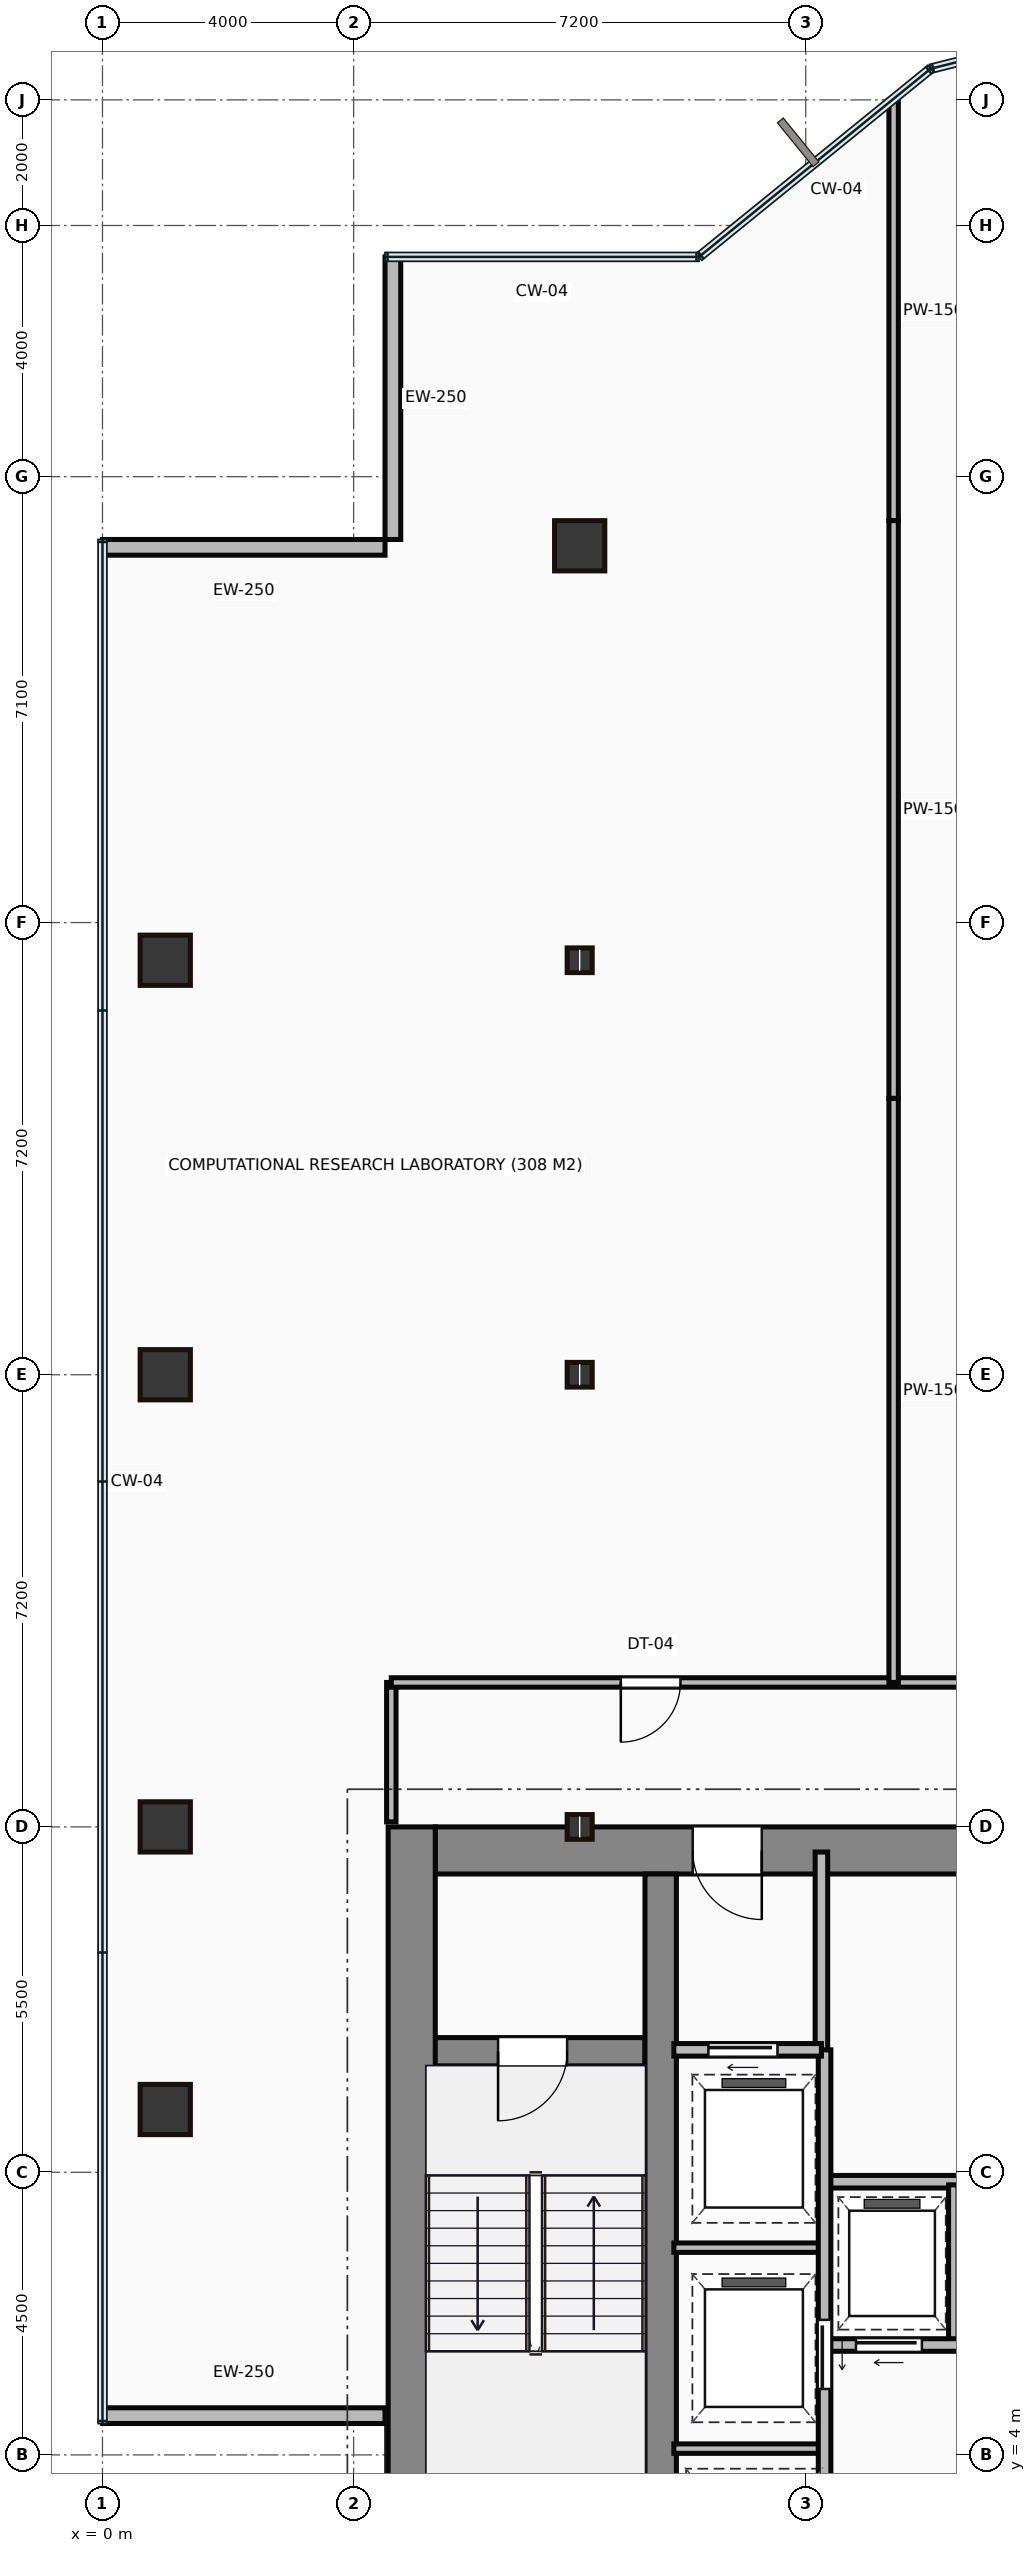
"""IFC4 building model, lengths in metres.
Left out: names, types, materials, properties, quantities, classifications, styles, units other than length and angle.
Written with IfcOpenShell. Run it as: python <this file> out.ifc"""

import sys

from ifc_helpers import new_model, si_unit, direction, frame, frame_2d, origin, origin_2d, place, context, subcontext, project, spatial, rectangle, hollow_rectangle, i_section, extrude, source, transform, mapped, element, fill, save


model = new_model("IFC4")
c1 = context("Model", 3, precision=1e-05, world=origin(), true_north=direction((0.0, 1.0)))
c2 = subcontext(c1, "Body", "Model", "MODEL_VIEW")
j1 = project(units=[si_unit("LENGTHUNIT", "METRE"), si_unit("PLANEANGLEUNIT", "RADIAN")], contexts=[c1])
p1 = place(None, origin())
s1 = spatial("IfcSite", under=j1, at=p1, CompositionType="ELEMENT")
p2 = place(p1, origin())
s2 = spatial("IfcBuilding", under=s1, at=p2, CompositionType="ELEMENT")
p3 = place(p2, frame((0.0, 0.0, 117.85)))
s3 = spatial("IfcBuildingStorey", under=s2, at=p3, CompositionType="ELEMENT", Elevation=117.85)
m1 = source(origin(), c2, "Body", "SweptSolid", [
    extrude(rectangle(XDim=13.1, YDim=0.75, at=frame_2d((6.55, 0.0))), origin(), (0.0, 0.0, 1.0), 3.65),
])
p4 = place(p3, frame((4.925, 0.9, 0.0), z_axis=(0.0, 0.0, 1.0), x_axis=(0.0, 1.0, 0.0)))
e1 = element("IfcWall", 1, at=p4, inside=s3, PredefinedType="SHEAR", context=c2, shape_type="MappedRepresentation", body=[
    mapped(m1, transform((0.0, 0.0, 0.0))),
])
m2 = source(origin(), c2, "Body", "SweptSolid", [
    extrude(rectangle(XDim=9.1, YDim=0.75, at=frame_2d((4.55, 0.0))), origin(), (0.0, 0.0, 1.0), 3.65),
])
p5 = place(p3, frame((5.3, 13.625, 0.0), z_axis=(0.0, 0.0, 1.0), x_axis=(1.0, 0.0, 0.0)))
e2 = element("IfcWall", 2, at=p5, inside=s3, PredefinedType="SHEAR", context=c2, shape_type="MappedRepresentation", body=[
    mapped(m2, transform((0.0, 0.0, 0.0))),
])
p6 = place(p5, frame((4.1, 0.0, 0.0)))
e3 = element("IfcOpeningElement", 3, at=p6, cuts=e2, PredefinedType="OPENING", context=c2, shape_type="SweptSolid", body=[
    extrude(rectangle(XDim=1.1, YDim=2.15, at=frame_2d((0.55, 1.075))), frame((0.0, 0.385, 0.0), z_axis=(0.0, -1.0, 0.0), x_axis=(1.0, 0.0, 0.0)), (0.0, 0.0, 1.0), 0.77),
])
m3 = source(origin(), c2, "Body", "SweptSolid", [
    extrude(rectangle(XDim=12.35, YDim=0.5, at=frame_2d((6.175, 0.0))), origin(), (0.0, 0.0, 1.0), 3.65),
])
p7 = place(p3, frame((8.89, 0.9, 0.0), z_axis=(0.0, 0.0, 1.0), x_axis=(0.0, 1.0, 0.0)))
e4 = element("IfcWall", 4, at=p7, inside=s3, PredefinedType="SHEAR", context=c2, shape_type="MappedRepresentation", body=[
    mapped(m3, transform((0.0, 0.0, 0.0))),
])
m4 = source(origin(), c2, "Body", "SweptSolid", [
    extrude(rectangle(XDim=3.39, YDim=0.45, at=frame_2d((1.695, 0.0))), origin(), (0.0, 0.0, 1.0), 3.65),
])
p8 = place(p3, frame((5.25, 10.42, 0.0), z_axis=(0.0, 0.0, 1.0), x_axis=(1.0, 0.0, 0.0)))
e5 = element("IfcWall", 5, at=p8, inside=s3, PredefinedType="SHEAR", context=c2, shape_type="MappedRepresentation", body=[
    mapped(m4, transform((0.0, 0.0, 0.0))),
])
p9 = place(p8, frame((1.05, 0.0, 0.0)))
e6 = element("IfcOpeningElement", 6, at=p9, cuts=e5, PredefinedType="OPENING", context=c2, shape_type="SweptSolid", body=[
    extrude(rectangle(XDim=1.1, YDim=2.15, at=frame_2d((0.55, 1.075))), frame((0.0, 0.235, 0.0), z_axis=(0.0, -1.0, 0.0), x_axis=(1.0, 0.0, 0.0)), (0.0, 0.0, 1.0), 0.47),
])
m5 = source(origin(), c2, "Body", "SweptSolid", [
    extrude(hollow_rectangle(XDim=0.8, YDim=0.8, WallThickness=0.04, at=origin_2d()), origin(), (0.0, 0.0, 1.0), 3.65),
])
for number, where, z_axis, x_axis in (
    (7, (1.0, 9.5, 0.0), (0.0, 0.0, 1.0), (1.0, 0.0, 0.0)),
    (8, (1.0, 14.0, 0.0), (0.0, 0.0, 1.0), (1.0, 0.0, 0.0)),
    (9, (1.0, 21.2, 0.0), (0.0, 0.0, 1.0), (1.0, 0.0, 0.0)),
    (10, (1.0, 27.8, 0.0), (0.0, 0.0, 1.0), (1.0, 0.0, 0.0)),
):
    element("IfcColumn", number, at=place(p3, frame(where, z_axis=z_axis, x_axis=x_axis)), inside=s3, PredefinedType="COLUMN", context=c2, shape_type="MappedRepresentation", body=[
        mapped(m5, transform((0.0, 0.0, 0.0))),
    ])
m6 = source(origin(), c2, "Body", "SweptSolid", [
    extrude(i_section(OverallWidth=0.399, OverallDepth=0.393, WebThickness=0.023, FlangeThickness=0.037, at=origin_2d()), origin(), (0.0, 0.0, 1.0), 3.65),
])
for number, where, z_axis, x_axis in (
    (11, (7.6, 14.0, 0.0), (0.0, 0.0, 1.0), (1.0, 0.0, 0.0)),
    (12, (7.6, 21.2, 0.0), (0.0, 0.0, 1.0), (1.0, 0.0, 0.0)),
    (13, (7.6, 27.8, 0.0), (0.0, 0.0, 1.0), (1.0, 0.0, 0.0)),
):
    element("IfcColumn", number, at=place(p3, frame(where, z_axis=z_axis, x_axis=x_axis)), inside=s3, PredefinedType="COLUMN", context=c2, shape_type="MappedRepresentation", body=[
        mapped(m6, transform((0.0, 0.0, 0.0))),
    ])
p10 = place(p3, frame((7.6, 34.4, 0.0), z_axis=(0.0, 0.0, 1.0), x_axis=(1.0, 0.0, 0.0)))
e14 = element("IfcColumn", 14, at=p10, inside=s3, PredefinedType="COLUMN", context=c2, shape_type="MappedRepresentation", body=[
    mapped(m5, transform((0.0, 0.0, 0.0))),
])
m7 = source(origin(), c2, "Body", "SweptSolid", [
    extrude(rectangle(XDim=4.5, YDim=0.25, at=frame_2d((2.25, 0.0))), origin(), (0.0, 0.0, 1.0), 3.4),
])
for number, where, z_axis, x_axis in (
    (15, (4.625, 39.0, 0.0), (0.0, 0.0, 1.0), (0.0, -1.0, 0.0)),
    (16, (4.5, 34.375, 0.0), (0.0, 0.0, 1.0), (-1.0, 0.0, 0.0)),
    (17, (0.0, 4.625, 0.0), (0.0, 0.0, 1.0), (1.0, 0.0, 0.0)),
):
    element("IfcWall", number, at=place(p3, frame(where, z_axis=z_axis, x_axis=x_axis)), inside=s3, PredefinedType="STANDARD", context=c2, shape_type="MappedRepresentation", body=[
        mapped(m7, transform((0.0, 0.0, 0.0))),
    ])
m8 = source(origin(), c2, "Body", "SweptSolid", [
    extrude(rectangle(XDim=3.18, YDim=0.2, at=frame_2d((1.59, 0.0))), origin(), (0.0, 0.0, 1.0), 3.4),
])
p11 = place(p3, frame((11.45, 10.42, 0.0), z_axis=(0.0, 0.0, 1.0), x_axis=(0.0, 1.0, 0.0)))
e18 = element("IfcWall", 18, at=p11, inside=s3, PredefinedType="PARTITIONING", context=c2, shape_type="MappedRepresentation", body=[
    mapped(m8, transform((0.0, 0.0, 0.0))),
])
m9 = source(origin(), c2, "Body", "SweptSolid", [
    extrude(rectangle(XDim=2.35, YDim=0.2, at=frame_2d((1.175, 0.0))), origin(), (0.0, 0.0, 1.0), 3.4),
])
p12 = place(p3, frame((9.1, 10.45, 0.0), z_axis=(0.0, 0.0, 1.0), x_axis=(1.0, 0.0, 0.0)))
e19 = element("IfcWall", 19, at=p12, inside=s3, PredefinedType="PARTITIONING", context=c2, shape_type="MappedRepresentation", body=[
    mapped(m9, transform((0.0, 0.0, 0.0))),
])
p13 = place(p12, frame((0.55, 0.0, 0.0)))
e20 = element("IfcOpeningElement", 20, at=p13, cuts=e19, PredefinedType="OPENING", context=c2, shape_type="SweptSolid", body=[
    extrude(rectangle(XDim=1.1, YDim=2.15, at=frame_2d((0.55, 1.075))), frame((0.0, 0.11, 0.0), z_axis=(0.0, -1.0, 0.0), x_axis=(1.0, 0.0, 0.0)), (0.0, 0.0, 1.0), 0.22),
])
m10 = source(origin(), c2, "Body", "SweptSolid", [
    extrude(rectangle(XDim=9.6, YDim=0.2, at=frame_2d((4.8, 0.0))), origin(), (0.0, 0.0, 1.0), 3.4),
])
p14 = place(p3, frame((11.5, 0.85, 0.0), z_axis=(0.0, 0.0, 1.0), x_axis=(0.0, 1.0, 0.0)))
e21 = element("IfcWall", 21, at=p14, inside=s3, PredefinedType="PARTITIONING", context=c2, shape_type="MappedRepresentation", body=[
    mapped(m10, transform((0.0, 0.0, 0.0))),
])
p15 = place(p14, frame((4.2, 0.0, 0.0)))
e22 = element("IfcOpeningElement", 22, at=p15, cuts=e21, PredefinedType="OPENING", context=c2, shape_type="SweptSolid", body=[
    extrude(rectangle(XDim=1.1, YDim=2.15, at=frame_2d((0.55, 1.075))), frame((0.0, 0.11, 0.0), z_axis=(0.0, -1.0, 0.0), x_axis=(1.0, 0.0, 0.0)), (0.0, 0.0, 1.0), 0.22),
])
p16 = place(p14, frame((0.9, 0.0, 0.0)))
e23 = element("IfcOpeningElement", 23, at=p16, cuts=e21, PredefinedType="OPENING", context=c2, shape_type="SweptSolid", body=[
    extrude(rectangle(XDim=1.2, YDim=2.15, at=frame_2d((0.6, 1.075))), frame((0.0, 0.11, 0.0), z_axis=(0.0, -1.0, 0.0), x_axis=(1.0, 0.0, 0.0)), (0.0, 0.0, 1.0), 0.22),
])
m11 = source(origin(), c2, "Body", "SweptSolid", [
    extrude(rectangle(XDim=2.4, YDim=0.15, at=frame_2d((1.2, 0.0))), origin(), (0.0, 0.0, 1.0), 3.4),
])
for number, where, z_axis, x_axis in (
    (24, (9.1, 4.1, 0.0), (0.0, 0.0, 1.0), (1.0, 0.0, 0.0)),
    (25, (9.1, 7.3, 0.0), (0.0, 0.0, 1.0), (1.0, 0.0, 0.0)),
):
    element("IfcWall", number, at=place(p3, frame(where, z_axis=z_axis, x_axis=x_axis)), inside=s3, PredefinedType="PARTITIONING", context=c2, shape_type="MappedRepresentation", body=[
        mapped(m11, transform((0.0, 0.0, 0.0))),
    ])
m12 = source(origin(), c2, "Body", "SweptSolid", [
    extrude(rectangle(XDim=11.85, YDim=0.2, at=frame_2d((5.925, 0.0))), origin(), (0.0, 0.0, 1.0), 3.4),
])
p17 = place(p3, frame((11.55, 5.75, 0.0), z_axis=(0.0, 0.0, 1.0), x_axis=(1.0, 0.0, 0.0)))
e26 = element("IfcWall", 26, at=p17, inside=s3, PredefinedType="PARTITIONING", context=c2, shape_type="MappedRepresentation", body=[
    mapped(m12, transform((0.0, 0.0, 0.0))),
])
p18 = place(p17, frame((0.45, 0.0, 0.0)))
e27 = element("IfcOpeningElement", 27, at=p18, cuts=e26, PredefinedType="OPENING", context=c2, shape_type="SweptSolid", body=[
    extrude(rectangle(XDim=1.05, YDim=2.15, at=frame_2d((0.525, 1.075))), frame((0.0, 0.11, 0.0), z_axis=(0.0, -1.0, 0.0), x_axis=(1.0, 0.0, 0.0)), (0.0, 0.0, 1.0), 0.22),
])
p19 = place(p17, frame((2.4, 0.0, 0.0)))
e28 = element("IfcOpeningElement", 28, at=p19, cuts=e26, PredefinedType="OPENING", context=c2, shape_type="SweptSolid", body=[
    extrude(rectangle(XDim=1.05, YDim=2.15, at=frame_2d((0.525, 1.075))), frame((0.0, 0.11, 0.0), z_axis=(0.0, -1.0, 0.0), x_axis=(1.0, 0.0, 0.0)), (0.0, 0.0, 1.0), 0.22),
])
p20 = place(p17, frame((4.35, 0.0, 0.0)))
e29 = element("IfcOpeningElement", 29, at=p20, cuts=e26, PredefinedType="OPENING", context=c2, shape_type="SweptSolid", body=[
    extrude(rectangle(XDim=1.05, YDim=2.15, at=frame_2d((0.525, 1.075))), frame((0.0, 0.11, 0.0), z_axis=(0.0, -1.0, 0.0), x_axis=(1.0, 0.0, 0.0)), (0.0, 0.0, 1.0), 0.22),
])
p21 = place(p17, frame((6.3, 0.0, 0.0)))
e30 = element("IfcOpeningElement", 30, at=p21, cuts=e26, PredefinedType="OPENING", context=c2, shape_type="SweptSolid", body=[
    extrude(rectangle(XDim=1.05, YDim=2.15, at=frame_2d((0.525, 1.075))), frame((0.0, 0.11, 0.0), z_axis=(0.0, -1.0, 0.0), x_axis=(1.0, 0.0, 0.0)), (0.0, 0.0, 1.0), 0.22),
])
p22 = place(p17, frame((8.25, 0.0, 0.0)))
e31 = element("IfcOpeningElement", 31, at=p22, cuts=e26, PredefinedType="OPENING", context=c2, shape_type="SweptSolid", body=[
    extrude(rectangle(XDim=1.05, YDim=2.15, at=frame_2d((0.525, 1.075))), frame((0.0, 0.11, 0.0), z_axis=(0.0, -1.0, 0.0), x_axis=(1.0, 0.0, 0.0)), (0.0, 0.0, 1.0), 0.22),
])
p23 = place(p17, frame((10.2, 0.0, 0.0)))
e32 = element("IfcOpeningElement", 32, at=p23, cuts=e26, PredefinedType="OPENING", context=c2, shape_type="SweptSolid", body=[
    extrude(rectangle(XDim=1.05, YDim=2.15, at=frame_2d((0.525, 1.075))), frame((0.0, 0.11, 0.0), z_axis=(0.0, -1.0, 0.0), x_axis=(1.0, 0.0, 0.0)), (0.0, 0.0, 1.0), 0.22),
])
p24 = place(p3, frame((11.55, 8.35, 0.0), z_axis=(0.0, 0.0, 1.0), x_axis=(1.0, 0.0, 0.0)))
e33 = element("IfcWall", 33, at=p24, inside=s3, PredefinedType="PARTITIONING", context=c2, shape_type="MappedRepresentation", body=[
    mapped(m12, transform((0.0, 0.0, 0.0))),
])
m13 = source(origin(), c2, "Body", "SweptSolid", [
    extrude(rectangle(XDim=2.5, YDim=0.15, at=frame_2d((1.25, 0.0))), origin(), (0.0, 0.0, 1.0), 3.4),
])
p25 = place(p3, frame((13.55, 5.8, 0.0), z_axis=(0.0, 0.0, 1.0), x_axis=(0.0, 1.0, 0.0)))
e34 = element("IfcWall", 34, at=p25, inside=s3, PredefinedType="PARTITIONING", context=c2, shape_type="MappedRepresentation", body=[
    mapped(m13, transform((0.0, 0.0, 0.0))),
])
m14 = source(origin(), c2, "Body", "SweptSolid", [
    extrude(rectangle(XDim=2.22, YDim=0.15, at=frame_2d((1.11, 0.0))), origin(), (0.0, 0.0, 1.0), 3.4),
])
p26 = place(p3, frame((4.6, 14.08, 0.0), z_axis=(0.0, 0.0, 1.0), x_axis=(0.0, 1.0, 0.0)))
e35 = element("IfcWall", 35, at=p26, inside=s3, PredefinedType="PARTITIONING", context=c2, shape_type="MappedRepresentation", body=[
    mapped(m14, transform((0.0, 0.0, 0.0))),
])
m15 = source(origin(), c2, "Body", "SweptSolid", [
    extrude(rectangle(XDim=25.8, YDim=0.15, at=frame_2d((12.9, 0.0))), origin(), (0.0, 0.0, 1.0), 3.4),
])
p27 = place(p3, frame((4.6, 16.3, 0.0), z_axis=(0.0, 0.0, 1.0), x_axis=(1.0, 0.0, 0.0)))
e36 = element("IfcWall", 36, at=p27, inside=s3, PredefinedType="PARTITIONING", context=c2, shape_type="MappedRepresentation", body=[
    mapped(m15, transform((0.0, 0.0, 0.0))),
])
p28 = place(p27, frame((3.655, 0.0, 0.0)))
e37 = element("IfcOpeningElement", 37, at=p28, cuts=e36, PredefinedType="OPENING", context=c2, shape_type="SweptSolid", body=[
    extrude(rectangle(XDim=0.95, YDim=2.15, at=frame_2d((0.475, 1.075))), frame((0.0, 0.085, 0.0), z_axis=(0.0, -1.0, 0.0), x_axis=(1.0, 0.0, 0.0)), (0.0, 0.0, 1.0), 0.17),
])
p29 = place(p27, frame((16.295, 0.0, 0.0)))
e38 = element("IfcOpeningElement", 38, at=p29, cuts=e36, PredefinedType="OPENING", context=c2, shape_type="SweptSolid", body=[
    extrude(rectangle(XDim=0.95, YDim=2.15, at=frame_2d((0.475, 1.075))), frame((0.0, 0.085, 0.0), z_axis=(0.0, -1.0, 0.0), x_axis=(1.0, 0.0, 0.0)), (0.0, 0.0, 1.0), 0.17),
])
m16 = source(origin(), c2, "Body", "SweptSolid", [
    extrude(rectangle(XDim=6.692, YDim=0.15, at=frame_2d((3.346, 0.0))), origin(), (0.0, 0.0, 1.0), 3.4),
])
p30 = place(p3, frame((12.6, 41.492, 0.0), z_axis=(0.0, 0.0, 1.0), x_axis=(0.0, -1.0, 0.0)))
e39 = element("IfcWall", 39, at=p30, inside=s3, PredefinedType="PARTITIONING", context=c2, shape_type="MappedRepresentation", body=[
    mapped(m16, transform((0.0, 0.0, 0.0))),
])
m17 = source(origin(), c2, "Body", "SweptSolid", [
    extrude(rectangle(XDim=9.2, YDim=0.15, at=frame_2d((4.6, 0.0))), origin(), (0.0, 0.0, 1.0), 3.4),
])
p31 = place(p3, frame((12.6, 34.8, 0.0), z_axis=(0.0, 0.0, 1.0), x_axis=(0.0, -1.0, 0.0)))
e40 = element("IfcWall", 40, at=p31, inside=s3, PredefinedType="PARTITIONING", context=c2, shape_type="MappedRepresentation", body=[
    mapped(m17, transform((0.0, 0.0, 0.0))),
])
m18 = source(origin(), c2, "Body", "SweptSolid", [
    extrude(rectangle(XDim=9.3, YDim=0.15, at=frame_2d((4.65, 0.0))), origin(), (0.0, 0.0, 1.0), 3.4),
])
p32 = place(p3, frame((12.6, 25.6, 0.0), z_axis=(0.0, 0.0, 1.0), x_axis=(0.0, -1.0, 0.0)))
e41 = element("IfcWall", 41, at=p32, inside=s3, PredefinedType="PARTITIONING", context=c2, shape_type="MappedRepresentation", body=[
    mapped(m18, transform((0.0, 0.0, 0.0))),
])
m19 = source(origin(), c2, "Body", "SweptSolid", [
    extrude(rectangle(XDim=1.1, YDim=2.15, at=frame_2d((0.55, 1.075))), frame((0.0, 0.025, 0.0), z_axis=(0.0, -1.0, 0.0), x_axis=(1.0, 0.0, 0.0)), (0.0, 0.0, 1.0), 0.05),
])
p33 = place(p9, frame((1.1, 0.0, 0.0), z_axis=(0.0, 0.0, 1.0), x_axis=(-1.0, 0.0, 0.0)))
e42 = element("IfcDoor", 42, at=p33, inside=s3, OperationType="SINGLE_SWING_LEFT", PredefinedType="DOOR", context=c2, shape_type="MappedRepresentation", body=[
    mapped(m19, transform((0.0, 0.0, 0.0))),
])
fill(e6, e42)
p34 = place(p6, origin())
e43 = element("IfcDoor", 43, at=p34, inside=s3, OperationType="SINGLE_SWING_RIGHT", PredefinedType="DOOR", context=c2, shape_type="MappedRepresentation", body=[
    mapped(m19, transform((0.0, 0.0, 0.0))),
])
fill(e3, e43)
p35 = place(p13, origin())
e44 = element("IfcDoor", 44, at=p35, inside=s3, OperationType="SLIDING_TO_LEFT", PredefinedType="DOOR", context=c2, shape_type="MappedRepresentation", body=[
    mapped(m19, transform((0.0, 0.0, 0.0))),
])
fill(e20, e44)
p36 = place(p15, frame((1.1, 0.0, 0.0), z_axis=(0.0, 0.0, 1.0), x_axis=(-1.0, 0.0, 0.0)))
e45 = element("IfcDoor", 45, at=p36, inside=s3, OperationType="SLIDING_TO_LEFT", PredefinedType="DOOR", context=c2, shape_type="MappedRepresentation", body=[
    mapped(m19, transform((0.0, 0.0, 0.0))),
])
fill(e22, e45)
m20 = source(origin(), c2, "Body", "SweptSolid", [
    extrude(rectangle(XDim=1.05, YDim=2.15, at=frame_2d((0.525, 1.075))), frame((0.0, 0.025, 0.0), z_axis=(0.0, -1.0, 0.0), x_axis=(1.0, 0.0, 0.0)), (0.0, 0.0, 1.0), 0.05),
])
p37 = place(p18, frame((1.05, 0.0, 0.0), z_axis=(0.0, 0.0, 1.0), x_axis=(-1.0, 0.0, 0.0)))
e46 = element("IfcDoor", 46, at=p37, inside=s3, OperationType="SLIDING_TO_LEFT", PredefinedType="DOOR", context=c2, shape_type="MappedRepresentation", body=[
    mapped(m20, transform((0.0, 0.0, 0.0))),
])
fill(e27, e46)
m21 = source(origin(), c2, "Body", "SweptSolid", [
    extrude(rectangle(XDim=0.95, YDim=2.15, at=frame_2d((0.475, 1.075))), frame((0.0, 0.025, 0.0), z_axis=(0.0, -1.0, 0.0), x_axis=(1.0, 0.0, 0.0)), (0.0, 0.0, 1.0), 0.05),
])
p38 = place(p28, origin())
e47 = element("IfcDoor", 47, at=p38, inside=s3, OperationType="SINGLE_SWING_LEFT", PredefinedType="DOOR", context=c2, shape_type="MappedRepresentation", body=[
    mapped(m21, transform((0.0, 0.0, 0.0))),
])
fill(e37, e47)
save(model, sys.argv[1])
